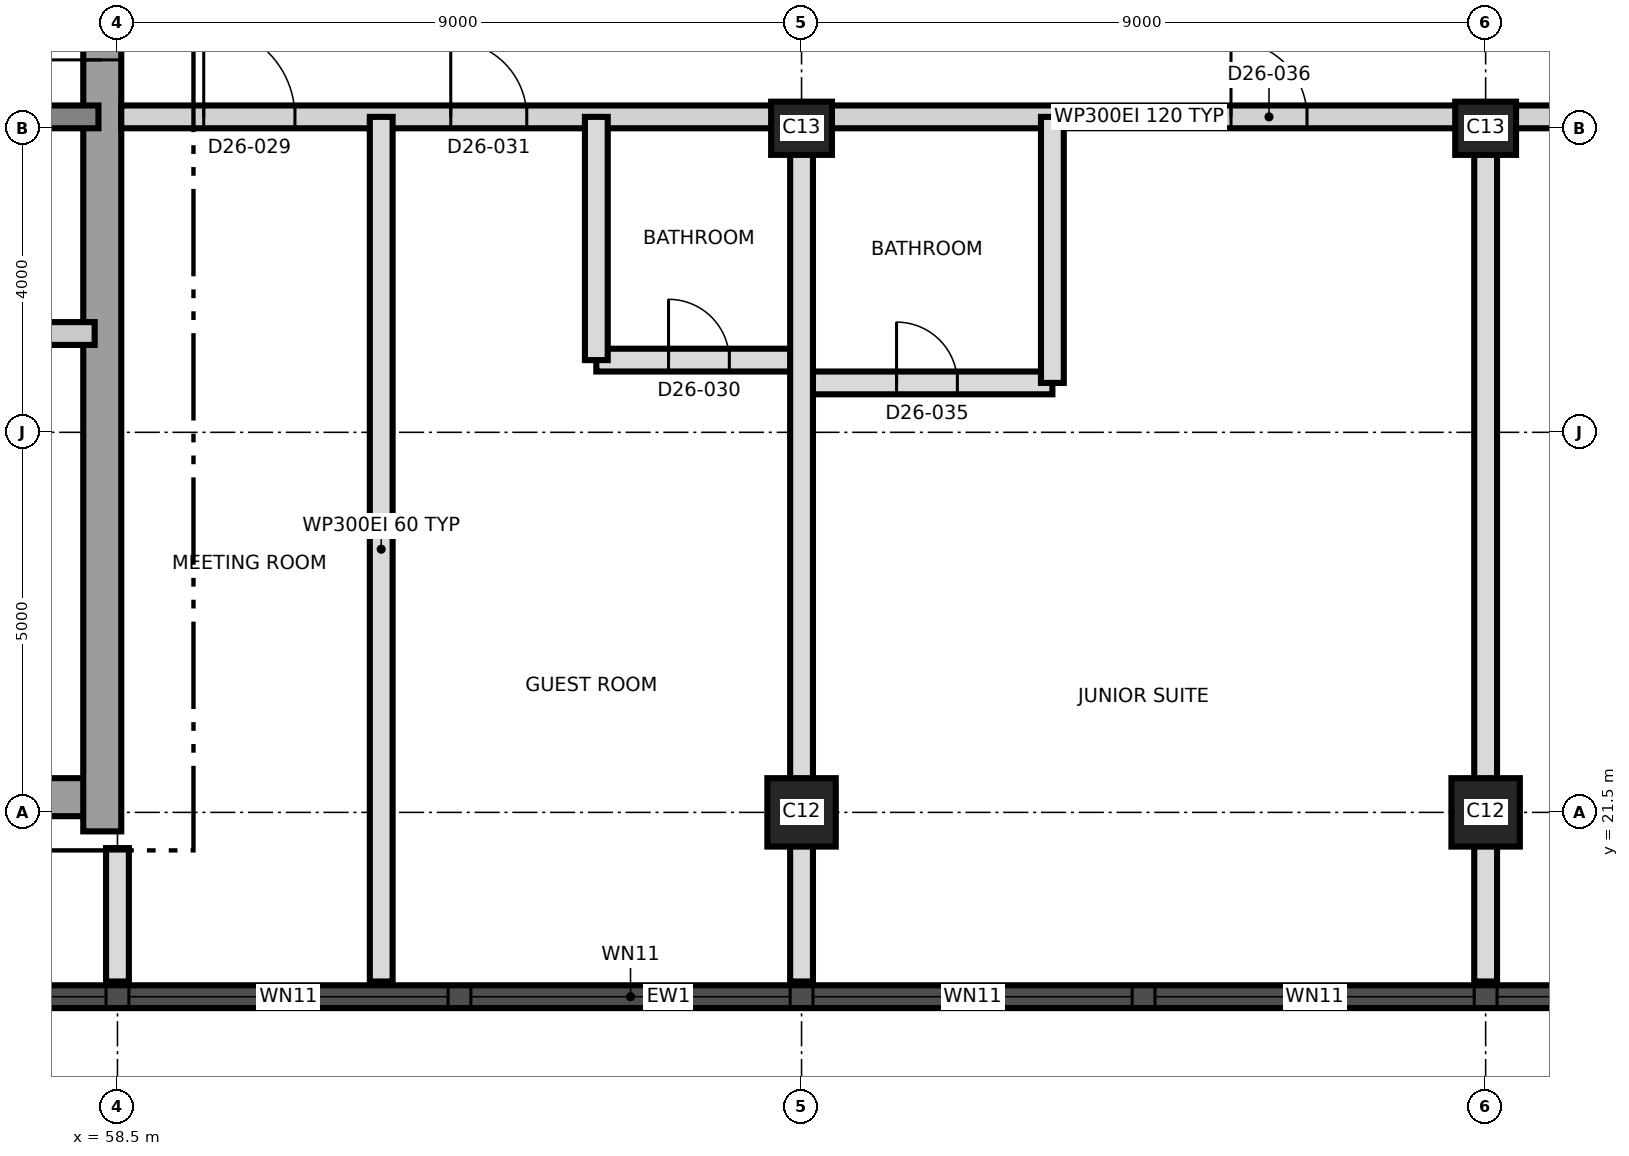
"""IFC4 building model, lengths in metres.
Left out: names, types, materials, properties, quantities, classifications, styles, units other than length and angle.
Written with IfcOpenShell. Run it as: python <this file> out.ifc"""

import sys

from ifc_helpers import new_model, si_unit, direction, frame, frame_2d, origin, origin_2d, place, context, subcontext, project, spatial, rectangle, extrude, element, fill, save


model = new_model("IFC4")
c1 = context("Model", 3, precision=1e-05, world=origin(), true_north=direction((0.0, 1.0)))
c2 = subcontext(c1, "Body", "Model", "MODEL_VIEW")
j1 = project(units=[si_unit("LENGTHUNIT", "METRE"), si_unit("PLANEANGLEUNIT", "RADIAN")], contexts=[c1])
p1 = place(None, origin())
s1 = spatial("IfcSite", under=j1, at=p1, CompositionType="ELEMENT")
p2 = place(p1, origin())
s2 = spatial("IfcBuilding", under=s1, at=p2, CompositionType="ELEMENT")
p3 = place(p2, frame((0.0, 0.0, 236.5)))
s3 = spatial("IfcBuildingStorey", under=s2, at=p3, CompositionType="ELEMENT", Elevation=236.5)
p4 = place(p3, frame((31.25, 21.7, 0.0), z_axis=(0.0, 0.0, 1.0), x_axis=(1.0, 0.0, 0.0)))
e1 = element("IfcWall", 1, at=p4, inside=s3, PredefinedType="SHEAR", context=c2, shape_type="SweptSolid", body=[
    extrude(rectangle(XDim=27.0, YDim=0.5, at=frame_2d((13.5, 0.0))), origin(), (0.0, 0.0, 1.0), 3.7),
])
p5 = place(p3, frame((58.3, 21.25, 0.0), z_axis=(0.0, 0.0, 1.0), x_axis=(0.0, 1.0, 0.0)))
e2 = element("IfcWall", 2, at=p5, inside=s3, PredefinedType="SHEAR", context=c2, shape_type="SweptSolid", body=[
    extrude(rectangle(XDim=18.5, YDim=0.5, at=frame_2d((9.25, 0.0))), origin(), (0.0, 0.0, 1.0), 3.7),
])
p6 = place(p5, frame((10.15, 0.0, 0.0)))
e3 = element("IfcOpeningElement", 3, at=p6, cuts=e2, PredefinedType="OPENING", context=c2, shape_type="SweptSolid", body=[
    extrude(rectangle(XDim=1.2, YDim=2.1, at=frame_2d((0.6, 1.05))), frame((0.0, 0.26, 0.0), z_axis=(0.0, -1.0, 0.0), x_axis=(1.0, 0.0, 0.0)), (0.0, 0.0, 1.0), 0.52),
])
p7 = place(p3, frame((31.75, 30.65, 0.0), z_axis=(0.0, 0.0, 1.0), x_axis=(1.0, 0.0, 0.0)))
e4 = element("IfcWall", 4, at=p7, inside=s3, PredefinedType="SHEAR", context=c2, shape_type="SweptSolid", body=[
    extrude(rectangle(XDim=26.5, YDim=0.3, at=frame_2d((13.25, 0.0))), origin(), (0.0, 0.0, 1.0), 3.7),
])
p8 = place(p7, frame((24.75, 0.0, 0.0)))
e5 = element("IfcOpeningElement", 5, at=p8, cuts=e4, PredefinedType="OPENING", context=c2, shape_type="SweptSolid", body=[
    extrude(rectangle(XDim=1.0, YDim=2.1, at=frame_2d((0.5, 1.05))), frame((0.0, 0.16, 0.0), z_axis=(0.0, -1.0, 0.0), x_axis=(1.0, 0.0, 0.0)), (0.0, 0.0, 1.0), 0.32),
])
for number, where, z_axis, x_axis in (
    (6, (67.5, 21.5, 0.0), (0.0, 0.0, 1.0), (1.0, 0.0, 0.0)),
    (7, (76.5, 21.5, 0.0), (0.0, 0.0, 1.0), (1.0, 0.0, 0.0)),
):
    element("IfcColumn", number, at=place(p3, frame(where, z_axis=z_axis, x_axis=x_axis)), inside=s3, PredefinedType="COLUMN", context=c2, shape_type="SweptSolid", body=[
        extrude(rectangle(XDim=0.9, YDim=0.9, at=origin_2d()), origin(), (0.0, 0.0, 1.0), 3.7),
    ])
for number, where, z_axis, x_axis in (
    (8, (67.5, 30.5, 0.0), (0.0, 0.0, 1.0), (1.0, 0.0, 0.0)),
    (9, (76.5, 30.5, 0.0), (0.0, 0.0, 1.0), (1.0, 0.0, 0.0)),
):
    element("IfcColumn", number, at=place(p3, frame(where, z_axis=z_axis, x_axis=x_axis)), inside=s3, PredefinedType="COLUMN", context=c2, shape_type="SweptSolid", body=[
        extrude(rectangle(XDim=0.8, YDim=0.7, at=origin_2d()), origin(), (0.0, 0.0, 1.0), 3.7),
    ])
p9 = place(p3, frame((44.01, 19.075, 0.0), z_axis=(0.0, 0.0, 1.0), x_axis=(1.0, 0.0, 0.0)))
e10 = element("IfcWall", 10, at=p9, inside=s3, PredefinedType="SOLIDWALL", context=c2, shape_type="SweptSolid", body=[
    extrude(rectangle(XDim=43.478, YDim=0.3, at=frame_2d((21.739, 0.0))), origin(), (0.0, 0.0, 1.0), 3.4),
])
p10 = place(p9, frame((1.845, 0.0, 0.3)))
e11 = element("IfcOpeningElement", 11, at=p10, cuts=e10, PredefinedType="OPENING", context=c2, shape_type="SweptSolid", body=[
    extrude(rectangle(XDim=1.8, YDim=2.4, at=frame_2d((0.9, 1.2))), frame((0.0, 0.16, 0.0), z_axis=(0.0, -1.0, 0.0), x_axis=(1.0, 0.0, 0.0)), (0.0, 0.0, 1.0), 0.32),
])
p11 = place(p9, frame((5.64, 0.0, 0.9)))
e12 = element("IfcOpeningElement", 12, at=p11, cuts=e10, PredefinedType="OPENING", context=c2, shape_type="SweptSolid", body=[
    extrude(rectangle(XDim=4.2, YDim=1.5, at=frame_2d((2.1, 0.75))), frame((0.0, 0.16, 0.0), z_axis=(0.0, -1.0, 0.0), x_axis=(1.0, 0.0, 0.0)), (0.0, 0.0, 1.0), 0.32),
])
p12 = place(p9, frame((10.14, 0.0, 0.9)))
e13 = element("IfcOpeningElement", 13, at=p12, cuts=e10, PredefinedType="OPENING", context=c2, shape_type="SweptSolid", body=[
    extrude(rectangle(XDim=4.2, YDim=1.5, at=frame_2d((2.1, 0.75))), frame((0.0, 0.16, 0.0), z_axis=(0.0, -1.0, 0.0), x_axis=(1.0, 0.0, 0.0)), (0.0, 0.0, 1.0), 0.32),
])
p13 = place(p9, frame((14.64, 0.0, 0.9)))
e14 = element("IfcOpeningElement", 14, at=p13, cuts=e10, PredefinedType="OPENING", context=c2, shape_type="SweptSolid", body=[
    extrude(rectangle(XDim=4.2, YDim=1.5, at=frame_2d((2.1, 0.75))), frame((0.0, 0.16, 0.0), z_axis=(0.0, -1.0, 0.0), x_axis=(1.0, 0.0, 0.0)), (0.0, 0.0, 1.0), 0.32),
])
p14 = place(p9, frame((19.14, 0.0, 0.9)))
e15 = element("IfcOpeningElement", 15, at=p14, cuts=e10, PredefinedType="OPENING", context=c2, shape_type="SweptSolid", body=[
    extrude(rectangle(XDim=4.2, YDim=1.5, at=frame_2d((2.1, 0.75))), frame((0.0, 0.16, 0.0), z_axis=(0.0, -1.0, 0.0), x_axis=(1.0, 0.0, 0.0)), (0.0, 0.0, 1.0), 0.32),
])
p15 = place(p9, frame((23.64, 0.0, 0.9)))
e16 = element("IfcOpeningElement", 16, at=p15, cuts=e10, PredefinedType="OPENING", context=c2, shape_type="SweptSolid", body=[
    extrude(rectangle(XDim=4.2, YDim=1.5, at=frame_2d((2.1, 0.75))), frame((0.0, 0.16, 0.0), z_axis=(0.0, -1.0, 0.0), x_axis=(1.0, 0.0, 0.0)), (0.0, 0.0, 1.0), 0.32),
])
p16 = place(p9, frame((28.14, 0.0, 0.9)))
e17 = element("IfcOpeningElement", 17, at=p16, cuts=e10, PredefinedType="OPENING", context=c2, shape_type="SweptSolid", body=[
    extrude(rectangle(XDim=4.2, YDim=1.5, at=frame_2d((2.1, 0.75))), frame((0.0, 0.16, 0.0), z_axis=(0.0, -1.0, 0.0), x_axis=(1.0, 0.0, 0.0)), (0.0, 0.0, 1.0), 0.32),
])
p17 = place(p9, frame((32.64, 0.0, 0.9)))
e18 = element("IfcOpeningElement", 18, at=p17, cuts=e10, PredefinedType="OPENING", context=c2, shape_type="SweptSolid", body=[
    extrude(rectangle(XDim=4.2, YDim=1.5, at=frame_2d((2.1, 0.75))), frame((0.0, 0.16, 0.0), z_axis=(0.0, -1.0, 0.0), x_axis=(1.0, 0.0, 0.0)), (0.0, 0.0, 1.0), 0.32),
])
p18 = place(p9, frame((37.14, 0.0, 0.9)))
e19 = element("IfcOpeningElement", 19, at=p18, cuts=e10, PredefinedType="OPENING", context=c2, shape_type="SweptSolid", body=[
    extrude(rectangle(XDim=4.2, YDim=1.5, at=frame_2d((2.1, 0.75))), frame((0.0, 0.16, 0.0), z_axis=(0.0, -1.0, 0.0), x_axis=(1.0, 0.0, 0.0)), (0.0, 0.0, 1.0), 0.32),
])
p19 = place(p3, frame((55.8, 27.8, 0.0), z_axis=(0.0, 0.0, 1.0), x_axis=(1.0, 0.0, 0.0)))
e20 = element("IfcWall", 20, at=p19, inside=s3, PredefinedType="PARTITIONING", context=c2, shape_type="SweptSolid", body=[
    extrude(rectangle(XDim=2.4, YDim=0.3, at=frame_2d((1.2, 0.0))), origin(), (0.0, 0.0, 1.0), 3.4),
])
p20 = place(p19, frame((0.75, 0.0, 0.0)))
e21 = element("IfcOpeningElement", 21, at=p20, cuts=e20, PredefinedType="OPENING", context=c2, shape_type="SweptSolid", body=[
    extrude(rectangle(XDim=0.9, YDim=2.1, at=frame_2d((0.45, 1.05))), frame((0.0, 0.16, 0.0), z_axis=(0.0, -1.0, 0.0), x_axis=(1.0, 0.0, 0.0)), (0.0, 0.0, 1.0), 0.32),
])
p21 = place(p3, frame((67.5, 27.15, 0.0), z_axis=(0.0, 0.0, 1.0), x_axis=(1.0, 0.0, 0.0)))
e22 = element("IfcWall", 22, at=p21, inside=s3, PredefinedType="PARTITIONING", context=c2, shape_type="SweptSolid", body=[
    extrude(rectangle(XDim=3.3, YDim=0.3, at=frame_2d((1.65, 0.0))), origin(), (0.0, 0.0, 1.0), 3.4),
])
p22 = place(p21, frame((1.25, 0.0, 0.0)))
e23 = element("IfcOpeningElement", 23, at=p22, cuts=e22, PredefinedType="OPENING", context=c2, shape_type="SweptSolid", body=[
    extrude(rectangle(XDim=0.8, YDim=2.1, at=frame_2d((0.4, 1.05))), frame((0.0, 0.16, 0.0), z_axis=(0.0, -1.0, 0.0), x_axis=(1.0, 0.0, 0.0)), (0.0, 0.0, 1.0), 0.32),
])
p23 = place(p3, frame((64.8, 27.45, 0.0), z_axis=(0.0, 0.0, 1.0), x_axis=(1.0, 0.0, 0.0)))
e24 = element("IfcWall", 24, at=p23, inside=s3, PredefinedType="PARTITIONING", context=c2, shape_type="SweptSolid", body=[
    extrude(rectangle(XDim=2.7, YDim=0.3, at=frame_2d((1.35, 0.0))), origin(), (0.0, 0.0, 1.0), 3.4),
])
p24 = place(p23, frame((0.95, 0.0, 0.0)))
e25 = element("IfcOpeningElement", 25, at=p24, cuts=e24, PredefinedType="OPENING", context=c2, shape_type="SweptSolid", body=[
    extrude(rectangle(XDim=0.8, YDim=2.1, at=frame_2d((0.4, 1.05))), frame((0.0, 0.16, 0.0), z_axis=(0.0, -1.0, 0.0), x_axis=(1.0, 0.0, 0.0)), (0.0, 0.0, 1.0), 0.32),
])
p25 = place(p3, frame((58.55, 30.65, 0.0), z_axis=(0.0, 0.0, 1.0), x_axis=(1.0, 0.0, 0.0)))
e26 = element("IfcWall", 26, at=p25, inside=s3, PredefinedType="PARTITIONING", context=c2, shape_type="SweptSolid", body=[
    extrude(rectangle(XDim=26.78, YDim=0.3, at=frame_2d((13.39, 0.0))), origin(), (0.0, 0.0, 1.0), 3.4),
])
p26 = place(p25, frame((1.085, 0.0, 0.0)))
e27 = element("IfcOpeningElement", 27, at=p26, cuts=e26, PredefinedType="OPENING", context=c2, shape_type="SweptSolid", body=[
    extrude(rectangle(XDim=1.2, YDim=2.1, at=frame_2d((0.6, 1.05))), frame((0.0, 0.16, 0.0), z_axis=(0.0, -1.0, 0.0), x_axis=(1.0, 0.0, 0.0)), (0.0, 0.0, 1.0), 0.32),
])
p27 = place(p25, frame((4.335, 0.0, 0.0)))
e28 = element("IfcOpeningElement", 28, at=p27, cuts=e26, PredefinedType="OPENING", context=c2, shape_type="SweptSolid", body=[
    extrude(rectangle(XDim=1.0, YDim=2.1, at=frame_2d((0.5, 1.05))), frame((0.0, 0.16, 0.0), z_axis=(0.0, -1.0, 0.0), x_axis=(1.0, 0.0, 0.0)), (0.0, 0.0, 1.0), 0.32),
])
p28 = place(p25, frame((14.6, 0.0, 0.0)))
e29 = element("IfcOpeningElement", 29, at=p28, cuts=e26, PredefinedType="OPENING", context=c2, shape_type="SweptSolid", body=[
    extrude(rectangle(XDim=1.0, YDim=2.4, at=frame_2d((0.5, 1.2))), frame((0.0, 0.16, 0.0), z_axis=(0.0, -1.0, 0.0), x_axis=(1.0, 0.0, 0.0)), (0.0, 0.0, 1.0), 0.32),
])
p29 = place(p25, frame((20.3, 0.0, 0.0)))
e30 = element("IfcOpeningElement", 30, at=p29, cuts=e26, PredefinedType="OPENING", context=c2, shape_type="SweptSolid", body=[
    extrude(rectangle(XDim=1.0, YDim=2.4, at=frame_2d((0.5, 1.2))), frame((0.0, 0.16, 0.0), z_axis=(0.0, -1.0, 0.0), x_axis=(1.0, 0.0, 0.0)), (0.0, 0.0, 1.0), 0.32),
])
p30 = place(p3, frame((58.5, 19.275, 0.0), z_axis=(0.0, 0.0, 1.0), x_axis=(0.0, 1.0, 0.0)))
e31 = element("IfcWall", 31, at=p30, inside=s3, PredefinedType="PARTITIONING", context=c2, shape_type="SweptSolid", body=[
    extrude(rectangle(XDim=1.755, YDim=0.3, at=frame_2d((0.877, 0.0))), origin(), (0.0, 0.0, 1.0), 3.4),
])
p31 = place(p3, frame((61.97, 19.275, 0.0), z_axis=(0.0, 0.0, 1.0), x_axis=(0.0, 1.0, 0.0)))
e32 = element("IfcWall", 32, at=p31, inside=s3, PredefinedType="PARTITIONING", context=c2, shape_type="SweptSolid", body=[
    extrude(rectangle(XDim=11.375, YDim=0.3, at=frame_2d((5.688, 0.0))), origin(), (0.0, 0.0, 1.0), 3.4),
])
p32 = place(p3, frame((64.8, 27.45, 0.0), z_axis=(0.0, 0.0, 1.0), x_axis=(0.0, 1.0, 0.0)))
e33 = element("IfcWall", 33, at=p32, inside=s3, PredefinedType="PARTITIONING", context=c2, shape_type="SweptSolid", body=[
    extrude(rectangle(XDim=3.2, YDim=0.3, at=frame_2d((1.6, 0.0))), origin(), (0.0, 0.0, 1.0), 3.4),
])
p33 = place(p3, frame((67.5, 19.275, 0.0), z_axis=(0.0, 0.0, 1.0), x_axis=(0.0, 1.0, 0.0)))
e34 = element("IfcWall", 34, at=p33, inside=s3, PredefinedType="PARTITIONING", context=c2, shape_type="SweptSolid", body=[
    extrude(rectangle(XDim=11.375, YDim=0.3, at=frame_2d((5.688, 0.0))), origin(), (0.0, 0.0, 1.0), 3.4),
])
p34 = place(p3, frame((70.8, 27.15, 0.0), z_axis=(0.0, 0.0, 1.0), x_axis=(0.0, 1.0, 0.0)))
e35 = element("IfcWall", 35, at=p34, inside=s3, PredefinedType="PARTITIONING", context=c2, shape_type="SweptSolid", body=[
    extrude(rectangle(XDim=3.5, YDim=0.3, at=frame_2d((1.75, 0.0))), origin(), (0.0, 0.0, 1.0), 3.4),
])
p35 = place(p3, frame((76.5, 19.275, 0.0), z_axis=(0.0, 0.0, 1.0), x_axis=(0.0, 1.0, 0.0)))
e36 = element("IfcWall", 36, at=p35, inside=s3, PredefinedType="PARTITIONING", context=c2, shape_type="SweptSolid", body=[
    extrude(rectangle(XDim=11.375, YDim=0.3, at=frame_2d((5.688, 0.0))), origin(), (0.0, 0.0, 1.0), 3.4),
])
p36 = place(p12, origin())
e37 = element("IfcWindow", 37, at=p36, inside=s3, PartitioningType="SINGLE_PANEL", PredefinedType="WINDOW", context=c2, shape_type="SweptSolid", body=[
    extrude(rectangle(XDim=4.2, YDim=1.5, at=frame_2d((2.1, 0.75))), frame((0.0, 0.03, 0.0), z_axis=(0.0, -1.0, 0.0), x_axis=(1.0, 0.0, 0.0)), (0.0, 0.0, 1.0), 0.06),
])
fill(e13, e37)
p37 = place(p13, origin())
e38 = element("IfcWindow", 38, at=p37, inside=s3, PartitioningType="SINGLE_PANEL", PredefinedType="WINDOW", context=c2, shape_type="SweptSolid", body=[
    extrude(rectangle(XDim=4.2, YDim=1.5, at=frame_2d((2.1, 0.75))), frame((0.0, 0.03, 0.0), z_axis=(0.0, -1.0, 0.0), x_axis=(1.0, 0.0, 0.0)), (0.0, 0.0, 1.0), 0.06),
])
fill(e14, e38)
p38 = place(p14, origin())
e39 = element("IfcWindow", 39, at=p38, inside=s3, PartitioningType="SINGLE_PANEL", PredefinedType="WINDOW", context=c2, shape_type="SweptSolid", body=[
    extrude(rectangle(XDim=4.2, YDim=1.5, at=frame_2d((2.1, 0.75))), frame((0.0, 0.03, 0.0), z_axis=(0.0, -1.0, 0.0), x_axis=(1.0, 0.0, 0.0)), (0.0, 0.0, 1.0), 0.06),
])
fill(e15, e39)
p39 = place(p15, origin())
e40 = element("IfcWindow", 40, at=p39, inside=s3, PartitioningType="SINGLE_PANEL", PredefinedType="WINDOW", context=c2, shape_type="SweptSolid", body=[
    extrude(rectangle(XDim=4.2, YDim=1.5, at=frame_2d((2.1, 0.75))), frame((0.0, 0.03, 0.0), z_axis=(0.0, -1.0, 0.0), x_axis=(1.0, 0.0, 0.0)), (0.0, 0.0, 1.0), 0.06),
])
fill(e16, e40)
p40 = place(p16, origin())
e41 = element("IfcWindow", 41, at=p40, inside=s3, PartitioningType="SINGLE_PANEL", PredefinedType="WINDOW", context=c2, shape_type="SweptSolid", body=[
    extrude(rectangle(XDim=4.2, YDim=1.5, at=frame_2d((2.1, 0.75))), frame((0.0, 0.03, 0.0), z_axis=(0.0, -1.0, 0.0), x_axis=(1.0, 0.0, 0.0)), (0.0, 0.0, 1.0), 0.06),
])
fill(e17, e41)
p41 = place(p17, origin())
e42 = element("IfcWindow", 42, at=p41, inside=s3, PartitioningType="SINGLE_PANEL", PredefinedType="WINDOW", context=c2, shape_type="SweptSolid", body=[
    extrude(rectangle(XDim=4.2, YDim=1.5, at=frame_2d((2.1, 0.75))), frame((0.0, 0.03, 0.0), z_axis=(0.0, -1.0, 0.0), x_axis=(1.0, 0.0, 0.0)), (0.0, 0.0, 1.0), 0.06),
])
fill(e18, e42)
p42 = place(p6, origin())
e43 = element("IfcDoor", 43, at=p42, inside=s3, OperationType="SINGLE_SWING_LEFT", PredefinedType="DOOR", context=c2, shape_type="SweptSolid", body=[
    extrude(rectangle(XDim=1.2, YDim=2.1, at=frame_2d((0.6, 1.05))), frame((0.0, 0.025, 0.0), z_axis=(0.0, -1.0, 0.0), x_axis=(1.0, 0.0, 0.0)), (0.0, 0.0, 1.0), 0.05),
])
fill(e3, e43)
p43 = place(p26, origin())
e44 = element("IfcDoor", 44, at=p43, inside=s3, OperationType="SINGLE_SWING_LEFT", PredefinedType="DOOR", context=c2, shape_type="SweptSolid", body=[
    extrude(rectangle(XDim=1.2, YDim=2.1, at=frame_2d((0.6, 1.05))), frame((0.0, 0.025, 0.0), z_axis=(0.0, -1.0, 0.0), x_axis=(1.0, 0.0, 0.0)), (0.0, 0.0, 1.0), 0.05),
])
fill(e27, e44)
p44 = place(p24, origin())
e45 = element("IfcDoor", 45, at=p44, inside=s3, OperationType="SINGLE_SWING_RIGHT", PredefinedType="DOOR", context=c2, shape_type="SweptSolid", body=[
    extrude(rectangle(XDim=0.8, YDim=2.1, at=frame_2d((0.4, 1.05))), frame((0.0, 0.025, 0.0), z_axis=(0.0, -1.0, 0.0), x_axis=(1.0, 0.0, 0.0)), (0.0, 0.0, 1.0), 0.05),
])
fill(e25, e45)
p45 = place(p27, origin())
e46 = element("IfcDoor", 46, at=p45, inside=s3, OperationType="SINGLE_SWING_LEFT", PredefinedType="DOOR", context=c2, shape_type="SweptSolid", body=[
    extrude(rectangle(XDim=1.0, YDim=2.1, at=frame_2d((0.5, 1.05))), frame((0.0, 0.025, 0.0), z_axis=(0.0, -1.0, 0.0), x_axis=(1.0, 0.0, 0.0)), (0.0, 0.0, 1.0), 0.05),
])
fill(e28, e46)
p46 = place(p22, origin())
e47 = element("IfcDoor", 47, at=p46, inside=s3, OperationType="SINGLE_SWING_LEFT", PredefinedType="DOOR", context=c2, shape_type="SweptSolid", body=[
    extrude(rectangle(XDim=0.8, YDim=2.1, at=frame_2d((0.4, 1.05))), frame((0.0, 0.025, 0.0), z_axis=(0.0, -1.0, 0.0), x_axis=(1.0, 0.0, 0.0)), (0.0, 0.0, 1.0), 0.05),
])
fill(e23, e47)
p47 = place(p28, origin())
e48 = element("IfcDoor", 48, at=p47, inside=s3, OperationType="SINGLE_SWING_LEFT", PredefinedType="DOOR", context=c2, shape_type="SweptSolid", body=[
    extrude(rectangle(XDim=1.0, YDim=2.4, at=frame_2d((0.5, 1.2))), frame((0.0, 0.025, 0.0), z_axis=(0.0, -1.0, 0.0), x_axis=(1.0, 0.0, 0.0)), (0.0, 0.0, 1.0), 0.05),
])
fill(e29, e48)
save(model, sys.argv[1])
